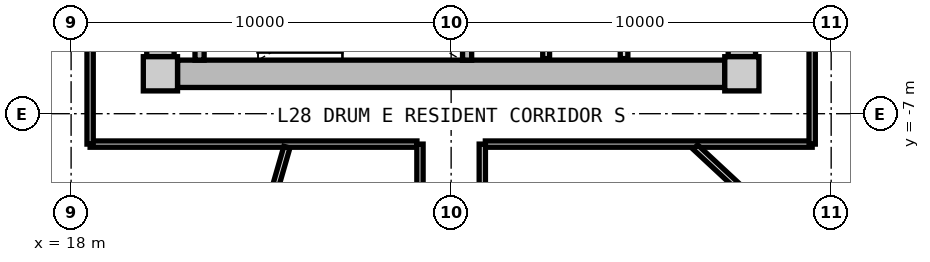
"""IFC4 building model, lengths in metres.
Left out: names, types, materials, properties, quantities, classifications, styles, units other than length and angle.
Written with IfcOpenShell. Run it as: python <this file> out.ifc"""

import sys

from ifc_helpers import new_model, si_unit, direction, frame, frame_2d, origin, origin_2d, place, context, subcontext, project, spatial, rectangle, extrude, source, transform, mapped, element, save


model = new_model("IFC4")
c1 = context("Model", 3, precision=1e-05, world=origin(), true_north=direction((0.0, 1.0)))
c2 = subcontext(c1, "Body", "Model", "MODEL_VIEW")
j1 = project(units=[si_unit("LENGTHUNIT", "METRE"), si_unit("PLANEANGLEUNIT", "RADIAN")], contexts=[c1])
p1 = place(None, origin())
s1 = spatial("IfcSite", under=j1, at=p1, CompositionType="ELEMENT")
p2 = place(p1, origin())
s2 = spatial("IfcBuilding", under=s1, at=p2, CompositionType="ELEMENT")
p3 = place(p2, frame((0.0, 0.0, 93.2)))
s3 = spatial("IfcBuildingStorey", under=s2, at=p3, CompositionType="ELEMENT", Elevation=93.2)
m1 = source(origin(), c2, "Body", "SweptSolid", [
    extrude(rectangle(XDim=0.9, YDim=0.9, at=origin_2d()), origin(), (0.0, 0.0, 1.0), 3.05),
])
for number, where, z_axis, x_axis in (
    (1, (20.35, -5.95, 0.0), (0.0, 0.0, 1.0), (1.0, 0.0, 0.0)),
    (2, (35.65, -5.95, 0.0), (0.0, 0.0, 1.0), (1.0, 0.0, 0.0)),
):
    element("IfcColumn", number, at=place(p3, frame(where, z_axis=z_axis, x_axis=x_axis)), inside=s3, PredefinedType="COLUMN", context=c2, shape_type="MappedRepresentation", body=[
        mapped(m1, transform((0.0, 0.0, 0.0), x_axis=(1.0, 0.0, 0.0), y_axis=(0.0, 1.0, 0.0), z_axis=(0.0, 0.0, 1.0), scale=1.0)),
    ])
m2 = source(origin(), c2, "Body", "SweptSolid", [
    extrude(rectangle(XDim=14.4, YDim=0.72, at=frame_2d((7.2, 0.0))), origin(), (0.0, 0.0, 1.0), 2.79),
])
p4 = place(p3, frame((35.2, -5.95, 0.0), z_axis=(0.0, 0.0, 1.0), x_axis=(-1.0, 0.0, 0.0)))
e3 = element("IfcWall", 3, at=p4, inside=s3, PredefinedType="SHEAR", context=c2, shape_type="MappedRepresentation", body=[
    mapped(m2, transform((0.0, 0.0, 0.0), x_axis=(1.0, 0.0, 0.0), y_axis=(0.0, 1.0, 0.0), z_axis=(0.0, 0.0, 1.0), scale=1.0)),
])
m3 = source(origin(), c2, "Body", "SweptSolid", [
    extrude(rectangle(XDim=11.0, YDim=0.72, at=frame_2d((5.5, 0.0))), origin(), (0.0, 0.0, 1.0), 2.79),
])
p5 = place(p3, frame((20.35, -5.5, 0.0), z_axis=(0.0, 0.0, 1.0), x_axis=(0.0, 1.0, 0.0)))
e4 = element("IfcWall", 4, at=p5, inside=s3, PredefinedType="SHEAR", context=c2, shape_type="MappedRepresentation", body=[
    mapped(m3, transform((0.0, 0.0, 0.0), x_axis=(1.0, 0.0, 0.0), y_axis=(0.0, 1.0, 0.0), z_axis=(0.0, 0.0, 1.0), scale=1.0)),
])
p6 = place(p5, frame((3.8, 0.0, 0.0)))
e5 = element("IfcOpeningElement", 5, at=p6, cuts=e4, PredefinedType="OPENING", context=c2, shape_type="SweptSolid", body=[
    extrude(rectangle(XDim=1.2, YDim=2.15, at=frame_2d((0.6, 1.075))), frame((0.0, 0.37, 0.0), z_axis=(0.0, -1.0, 0.0), x_axis=(1.0, 0.0, 0.0)), (0.0, 0.0, 1.0), 0.74),
])
p7 = place(p3, frame((35.65, 5.5, 0.0), z_axis=(0.0, 0.0, 1.0), x_axis=(0.0, -1.0, 0.0)))
e6 = element("IfcWall", 6, at=p7, inside=s3, PredefinedType="SHEAR", context=c2, shape_type="MappedRepresentation", body=[
    mapped(m3, transform((0.0, 0.0, 0.0), x_axis=(1.0, 0.0, 0.0), y_axis=(0.0, 1.0, 0.0), z_axis=(0.0, 0.0, 1.0), scale=1.0)),
])
p8 = place(p7, frame((5.65, 0.0, 0.0)))
e7 = element("IfcOpeningElement", 7, at=p8, cuts=e6, PredefinedType="OPENING", context=c2, shape_type="SweptSolid", body=[
    extrude(rectangle(XDim=1.2, YDim=2.15, at=frame_2d((0.6, 1.075))), frame((0.0, 0.37, 0.0), z_axis=(0.0, -1.0, 0.0), x_axis=(1.0, 0.0, 0.0)), (0.0, 0.0, 1.0), 0.74),
])
p9 = place(p7, frame((9.3, 0.0, 0.0)))
e8 = element("IfcOpeningElement", 8, at=p9, cuts=e6, PredefinedType="OPENING", context=c2, shape_type="SweptSolid", body=[
    extrude(rectangle(XDim=1.0, YDim=2.1, at=frame_2d((0.5, 1.05))), frame((0.0, 0.37, 0.0), z_axis=(0.0, -1.0, 0.0), x_axis=(1.0, 0.0, 0.0)), (0.0, 0.0, 1.0), 0.74),
])
m4 = source(origin(), c2, "Body", "SweptSolid", [
    extrude(rectangle(XDim=3.14, YDim=0.24, at=frame_2d((1.57, 0.0))), origin(), (0.0, 0.0, 1.0), 2.79),
])
for number, where, z_axis, x_axis in (
    (9, (21.38, -5.59, 0.0), (0.0, 0.0, 1.0), (0.0, 1.0, 0.0)),
    (10, (28.42, -5.59, 0.0), (0.0, 0.0, 1.0), (0.0, 1.0, 0.0)),
):
    element("IfcWall", number, at=place(p3, frame(where, z_axis=z_axis, x_axis=x_axis)), inside=s3, PredefinedType="PARTITIONING", context=c2, shape_type="MappedRepresentation", body=[
        mapped(m4, transform((0.0, 0.0, 0.0), x_axis=(1.0, 0.0, 0.0), y_axis=(0.0, 1.0, 0.0), z_axis=(0.0, 0.0, 1.0), scale=1.0)),
    ])
m5 = source(origin(), c2, "Body", "SweptSolid", [
    extrude(rectangle(XDim=3.8, YDim=0.2, at=frame_2d((1.9, 0.0))), origin(), (0.0, 0.0, 1.0), 2.775),
])
p10 = place(p3, frame((32.55, -5.55, 0.0), z_axis=(0.0, 0.0, 1.0), x_axis=(0.0, 1.0, 0.0)))
e11 = element("IfcWall", 11, at=p10, inside=s3, PredefinedType="PARTITIONING", context=c2, shape_type="MappedRepresentation", body=[
    mapped(m5, transform((0.0, 0.0, 0.0), x_axis=(1.0, 0.0, 0.0), y_axis=(0.0, 1.0, 0.0), z_axis=(0.0, 0.0, 1.0), scale=1.0)),
])
m6 = source(origin(), c2, "Body", "SweptSolid", [
    extrude(rectangle(XDim=3.22, YDim=0.18, at=frame_2d((1.61, 0.0))), origin(), (0.0, 0.0, 1.0), 2.775),
])
p11 = place(p3, frame((30.5, -5.55, 0.0), z_axis=(0.0, 0.0, 1.0), x_axis=(0.0, 1.0, 0.0)))
e12 = element("IfcWall", 12, at=p11, inside=s3, PredefinedType="PARTITIONING", context=c2, shape_type="MappedRepresentation", body=[
    mapped(m6, transform((0.0, 0.0, 0.0), x_axis=(1.0, 0.0, 0.0), y_axis=(0.0, 1.0, 0.0), z_axis=(0.0, 0.0, 1.0), scale=1.0)),
])
m7 = source(origin(), c2, "Body", "SweptSolid", [
    extrude(rectangle(XDim=8.6, YDim=0.165, at=frame_2d((4.3, 0.0))), origin(), (0.0, 0.0, 1.0), 2.775),
])
for number, where, z_axis, x_axis in (
    (13, (37.5, -7.8, 0.0), (0.0, 0.0, 1.0), (-1.0, 0.0, 0.0)),
    (14, (27.1, -7.8, 0.0), (0.0, 0.0, 1.0), (-1.0, 0.0, 0.0)),
):
    element("IfcWall", number, at=place(p3, frame(where, z_axis=z_axis, x_axis=x_axis)), inside=s3, PredefinedType="PARTITIONING", context=c2, shape_type="MappedRepresentation", body=[
        mapped(m7, transform((0.0, 0.0, 0.0), x_axis=(1.0, 0.0, 0.0), y_axis=(0.0, 1.0, 0.0), z_axis=(0.0, 0.0, 1.0), scale=1.0)),
    ])
m8 = source(origin(), c2, "Body", "SweptSolid", [
    extrude(rectangle(XDim=15.6, YDim=0.165, at=frame_2d((7.8, 0.0))), origin(), (0.0, 0.0, 1.0), 2.775),
])
p12 = place(p3, frame((18.5, -7.8, 0.0), z_axis=(0.0, 0.0, 1.0), x_axis=(0.0, 1.0, 0.0)))
e15 = element("IfcWall", 15, at=p12, inside=s3, PredefinedType="PARTITIONING", context=c2, shape_type="MappedRepresentation", body=[
    mapped(m8, transform((0.0, 0.0, 0.0), x_axis=(1.0, 0.0, 0.0), y_axis=(0.0, 1.0, 0.0), z_axis=(0.0, 0.0, 1.0), scale=1.0)),
])
p13 = place(p12, frame((5.673, 0.0, 0.0)))
e16 = element("IfcOpeningElement", 16, at=p13, cuts=e15, PredefinedType="OPENING", context=c2, shape_type="SweptSolid", body=[
    extrude(rectangle(XDim=1.05, YDim=2.15, at=frame_2d((0.525, 1.075))), frame((0.0, 0.093, 0.0), z_axis=(0.0, -1.0, 0.0), x_axis=(1.0, 0.0, 0.0)), (0.0, 0.0, 1.0), 0.185),
])
p14 = place(p3, frame((37.5, 7.8, 0.0), z_axis=(0.0, 0.0, 1.0), x_axis=(0.0, -1.0, 0.0)))
e17 = element("IfcWall", 17, at=p14, inside=s3, PredefinedType="PARTITIONING", context=c2, shape_type="MappedRepresentation", body=[
    mapped(m8, transform((0.0, 0.0, 0.0), x_axis=(1.0, 0.0, 0.0), y_axis=(0.0, 1.0, 0.0), z_axis=(0.0, 0.0, 1.0), scale=1.0)),
])
p15 = place(p14, frame((9.482, 0.0, 0.0)))
e18 = element("IfcOpeningElement", 18, at=p15, cuts=e17, PredefinedType="OPENING", context=c2, shape_type="SweptSolid", body=[
    extrude(rectangle(XDim=1.25, YDim=2.2, at=frame_2d((0.625, 1.1))), frame((0.0, 0.093, 0.0), z_axis=(0.0, -1.0, 0.0), x_axis=(1.0, 0.0, 0.0)), (0.0, 0.0, 1.0), 0.185),
])
m9 = source(origin(), c2, "Body", "SweptSolid", [
    extrude(rectangle(XDim=8.989, YDim=0.165, at=frame_2d((4.495, 0.0))), origin(), (0.0, 0.0, 1.0), 2.275),
])
p16 = place(p3, frame((23.678, -7.88, 0.0), z_axis=(0.0, 0.0, 1.0), x_axis=(-0.27702323008, -0.960863221274, 0.0)))
e19 = element("IfcWall", 19, at=p16, inside=s3, PredefinedType="PARTITIONING", context=c2, shape_type="MappedRepresentation", body=[
    mapped(m9, transform((0.0, 0.0, 0.0), x_axis=(1.0, 0.0, 0.0), y_axis=(0.0, 1.0, 0.0), z_axis=(0.0, 0.0, 1.0), scale=1.0)),
])
m10 = source(origin(), c2, "Body", "SweptSolid", [
    extrude(rectangle(XDim=6.187, YDim=0.165, at=frame_2d((3.093, 0.0))), origin(), (0.0, 0.0, 1.0), 2.275),
])
p17 = place(p3, frame((34.429, -7.88, 0.0), z_axis=(0.0, 0.0, 1.0), x_axis=(0.732501077882, -0.680765870841, 0.0)))
e20 = element("IfcWall", 20, at=p17, inside=s3, PredefinedType="PARTITIONING", context=c2, shape_type="MappedRepresentation", body=[
    mapped(m10, transform((0.0, 0.0, 0.0), x_axis=(1.0, 0.0, 0.0), y_axis=(0.0, 1.0, 0.0), z_axis=(0.0, 0.0, 1.0), scale=1.0)),
])
m11 = source(origin(), c2, "Body", "SweptSolid", [
    extrude(rectangle(XDim=7.56, YDim=0.165, at=frame_2d((3.78, 0.0))), origin(), (0.0, 0.0, 1.0), 2.775),
])
p18 = place(p3, frame((27.18, -15.36, 0.0), z_axis=(0.0, 0.0, 1.0), x_axis=(0.0, 1.0, 0.0)))
e21 = element("IfcWall", 21, at=p18, inside=s3, PredefinedType="PARTITIONING", context=c2, shape_type="MappedRepresentation", body=[
    mapped(m11, transform((0.0, 0.0, 0.0), x_axis=(1.0, 0.0, 0.0), y_axis=(0.0, 1.0, 0.0), z_axis=(0.0, 0.0, 1.0), scale=1.0)),
])
p19 = place(p18, frame((3.255, 0.0, 0.0)))
e22 = element("IfcOpeningElement", 22, at=p19, cuts=e21, PredefinedType="OPENING", context=c2, shape_type="SweptSolid", body=[
    extrude(rectangle(XDim=1.05, YDim=2.15, at=frame_2d((0.525, 1.075))), frame((0.0, 0.093, 0.0), z_axis=(0.0, -1.0, 0.0), x_axis=(1.0, 0.0, 0.0)), (0.0, 0.0, 1.0), 0.185),
])
p20 = place(p3, frame((28.82, -15.36, 0.0), z_axis=(0.0, 0.0, 1.0), x_axis=(0.0, 1.0, 0.0)))
e23 = element("IfcWall", 23, at=p20, inside=s3, PredefinedType="PARTITIONING", context=c2, shape_type="MappedRepresentation", body=[
    mapped(m11, transform((0.0, 0.0, 0.0), x_axis=(1.0, 0.0, 0.0), y_axis=(0.0, 1.0, 0.0), z_axis=(0.0, 0.0, 1.0), scale=1.0)),
])
p21 = place(p20, frame((3.255, 0.0, 0.0)))
e24 = element("IfcOpeningElement", 24, at=p21, cuts=e23, PredefinedType="OPENING", context=c2, shape_type="SweptSolid", body=[
    extrude(rectangle(XDim=1.05, YDim=2.15, at=frame_2d((0.525, 1.075))), frame((0.0, 0.093, 0.0), z_axis=(0.0, -1.0, 0.0), x_axis=(1.0, 0.0, 0.0)), (0.0, 0.0, 1.0), 0.185),
])
save(model, sys.argv[1])
